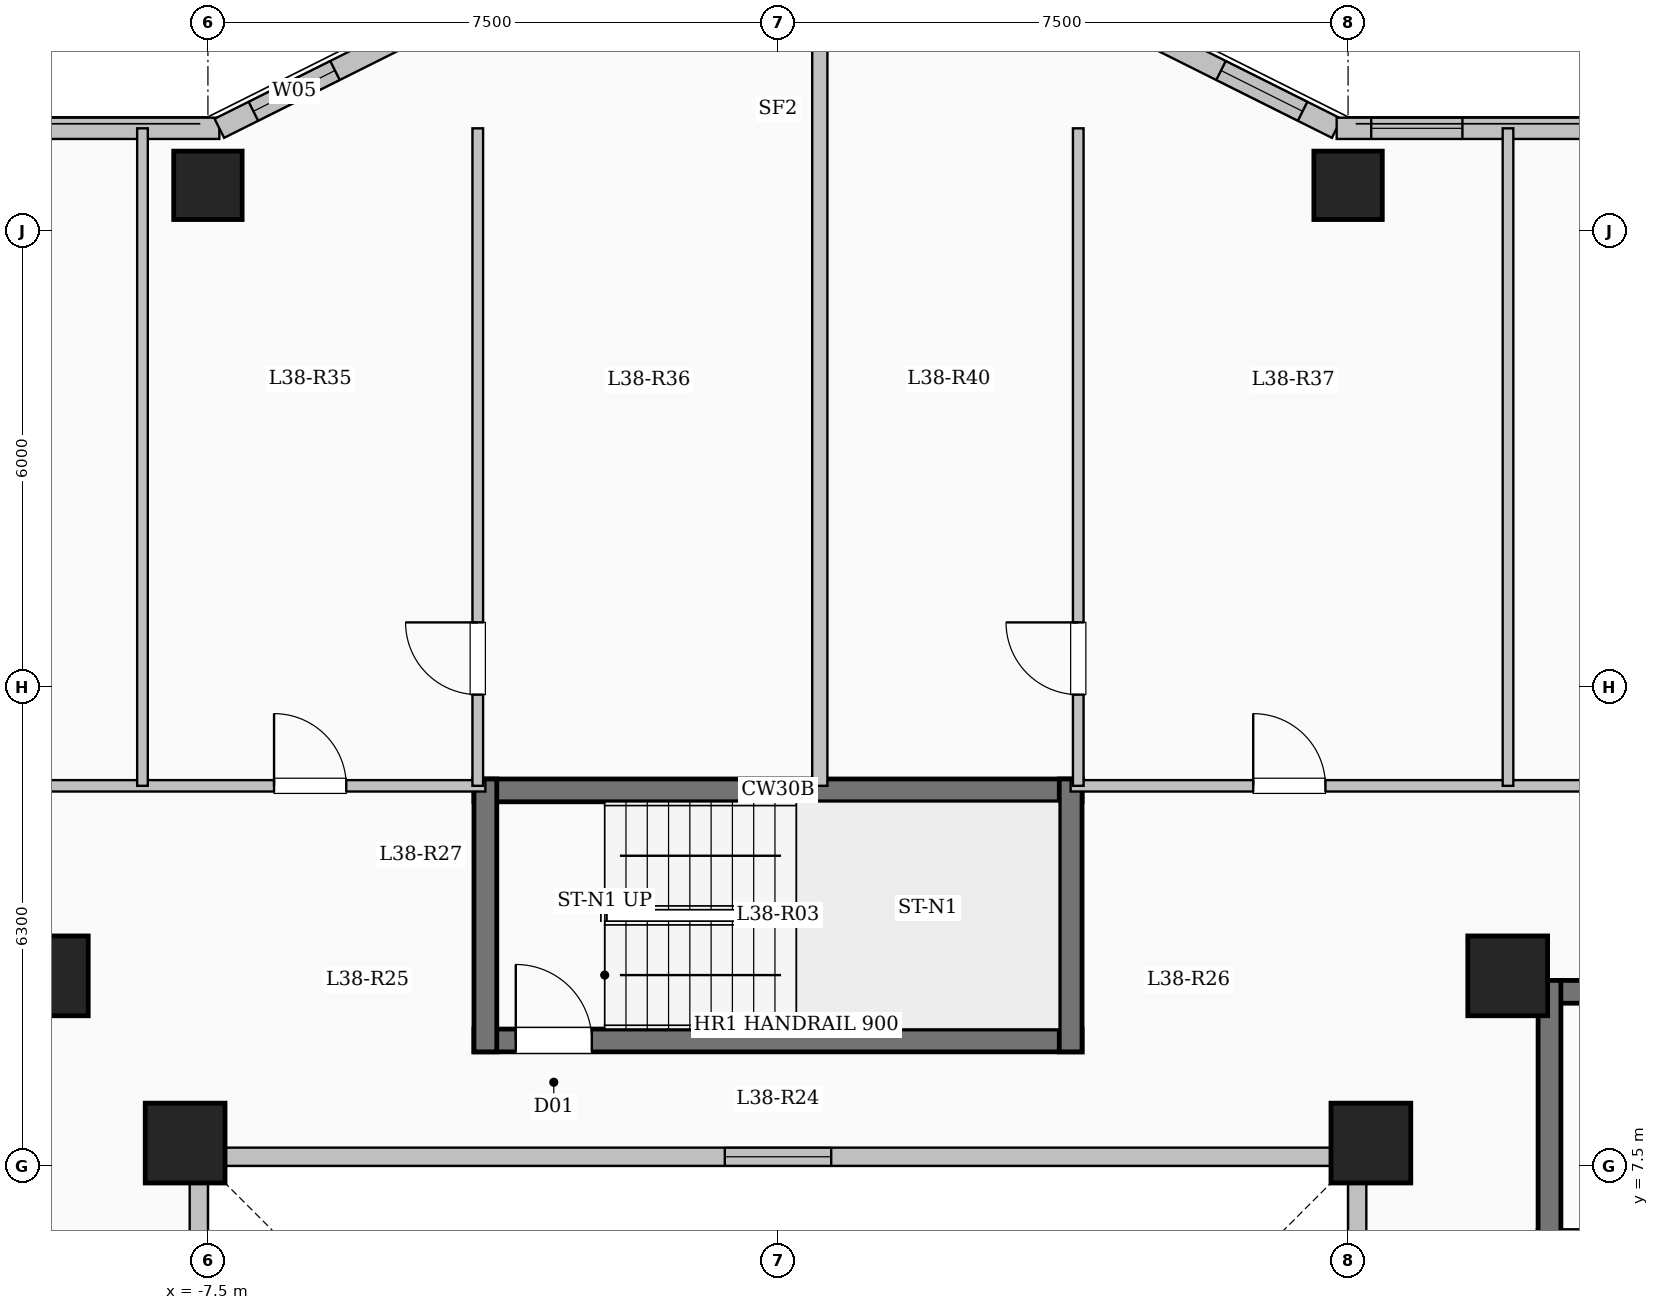
"""IFC4 building model, lengths in metres.
Left out: names, types, materials, properties, quantities, classifications, styles, units other than length and angle.
Written with IfcOpenShell. Run it as: python <this file> out.ifc"""

import sys

from ifc_helpers import new_model, si_unit, direction, frame, frame_2d, origin, origin_2d, place, context, subcontext, project, spatial, rectangle, extrude, element, fill, save


model = new_model("IFC4")
c1 = context("Model", 3, precision=1e-05, world=origin(), true_north=direction((0.0, 1.0)))
c2 = subcontext(c1, "Body", "Model", "MODEL_VIEW")
j1 = project(units=[si_unit("LENGTHUNIT", "METRE"), si_unit("PLANEANGLEUNIT", "RADIAN")], contexts=[c1])
p1 = place(None, origin())
s1 = spatial("IfcSite", under=j1, at=p1, CompositionType="ELEMENT")
p2 = place(p1, origin())
s2 = spatial("IfcBuilding", under=s1, at=p2, CompositionType="ELEMENT")
p3 = place(p2, frame((0.0, 0.0, 142.65)))
s3 = spatial("IfcBuildingStorey", under=s2, at=p3, CompositionType="ELEMENT", Elevation=142.65)
for number, where, z_axis, x_axis in (
    (1, (-7.8, 7.8, 0.0), (0.0, 0.0, 1.0), (1.0, 0.0, 0.0)),
    (2, (7.8, 7.8, 0.0), (0.0, 0.0, 1.0), (1.0, 0.0, 0.0)),
    (3, (-9.6, 10.0, 0.0), (0.0, 0.0, 1.0), (1.0, 0.0, 0.0)),
    (4, (9.6, 10.0, 0.0), (0.0, 0.0, 1.0), (1.0, 0.0, 0.0)),
):
    element("IfcColumn", number, at=place(p3, frame(where, z_axis=z_axis, x_axis=x_axis)), inside=s3, PredefinedType="COLUMN", context=c2, shape_type="SweptSolid", body=[
        extrude(rectangle(XDim=1.05, YDim=1.05, at=origin_2d()), origin(), (0.0, 0.0, 1.0), 3.35),
    ])
for number, where, z_axis, x_axis in (
    (5, (-7.5, 20.4, 0.0), (0.0, 0.0, 1.0), (1.0, 0.0, 0.0)),
    (6, (7.5, 20.4, 0.0), (0.0, 0.0, 1.0), (1.0, 0.0, 0.0)),
):
    element("IfcColumn", number, at=place(p3, frame(where, z_axis=z_axis, x_axis=x_axis)), inside=s3, PredefinedType="COLUMN", context=c2, shape_type="SweptSolid", body=[
        extrude(rectangle(XDim=0.9, YDim=0.9, at=origin_2d()), origin(), (0.0, 0.0, 1.0), 3.35),
    ])
p4 = place(p3, frame((7.62, -7.62, 0.0), z_axis=(0.0, 0.0, 1.0), x_axis=(0.0, 1.0, 0.0)))
e7 = element("IfcWall", 7, at=p4, inside=s3, PredefinedType="SOLIDWALL", context=c2, shape_type="SweptSolid", body=[
    extrude(rectangle(XDim=15.24, YDim=0.24, at=frame_2d((7.62, 0.0))), origin(), (0.0, 0.0, 1.0), 3.1),
])
p5 = place(p4, frame((6.92, 0.0, 0.95)))
e8 = element("IfcOpeningElement", 8, at=p5, cuts=e7, PredefinedType="OPENING", context=c2, shape_type="SweptSolid", body=[
    extrude(rectangle(XDim=1.4, YDim=1.5, at=frame_2d((0.7, 0.75))), frame((0.0, 0.13, 0.0), z_axis=(0.0, -1.0, 0.0), x_axis=(1.0, 0.0, 0.0)), (0.0, 0.0, 1.0), 0.26),
])
p6 = place(p3, frame((7.62, 7.62, 0.0), z_axis=(0.0, 0.0, 1.0), x_axis=(-1.0, 0.0, 0.0)))
e9 = element("IfcWall", 9, at=p6, inside=s3, PredefinedType="SOLIDWALL", context=c2, shape_type="SweptSolid", body=[
    extrude(rectangle(XDim=15.24, YDim=0.24, at=frame_2d((7.62, 0.0))), origin(), (0.0, 0.0, 1.0), 3.1),
])
p7 = place(p6, frame((6.92, 0.0, 0.95)))
e10 = element("IfcOpeningElement", 10, at=p7, cuts=e9, PredefinedType="OPENING", context=c2, shape_type="SweptSolid", body=[
    extrude(rectangle(XDim=1.4, YDim=1.5, at=frame_2d((0.7, 0.75))), frame((0.0, 0.13, 0.0), z_axis=(0.0, -1.0, 0.0), x_axis=(1.0, 0.0, 0.0)), (0.0, 0.0, 1.0), 0.26),
])
p8 = place(p3, frame((-7.62, 7.62, 0.0), z_axis=(0.0, 0.0, 1.0), x_axis=(0.0, -1.0, 0.0)))
e11 = element("IfcWall", 11, at=p8, inside=s3, PredefinedType="SOLIDWALL", context=c2, shape_type="SweptSolid", body=[
    extrude(rectangle(XDim=15.24, YDim=0.24, at=frame_2d((7.62, 0.0))), origin(), (0.0, 0.0, 1.0), 3.1),
])
p9 = place(p8, frame((6.92, 0.0, 0.95)))
e12 = element("IfcOpeningElement", 12, at=p9, cuts=e11, PredefinedType="OPENING", context=c2, shape_type="SweptSolid", body=[
    extrude(rectangle(XDim=1.4, YDim=1.5, at=frame_2d((0.7, 0.75))), frame((0.0, 0.13, 0.0), z_axis=(0.0, -1.0, 0.0), x_axis=(1.0, 0.0, 0.0)), (0.0, 0.0, 1.0), 0.26),
])
p10 = place(p3, frame((-19.65, 21.15, 0.0), z_axis=(0.0, 0.0, 1.0), x_axis=(1.0, 0.0, 0.0)))
e13 = element("IfcWall", 13, at=p10, inside=s3, PredefinedType="SOLIDWALL", context=c2, shape_type="SweptSolid", body=[
    extrude(rectangle(XDim=12.3, YDim=0.28, at=frame_2d((6.15, 0.0))), origin(), (0.0, 0.0, 1.0), 3.1),
])
p11 = place(p10, frame((1.862, 0.0, 0.9)))
e14 = element("IfcOpeningElement", 14, at=p11, cuts=e13, PredefinedType="OPENING", context=c2, shape_type="SweptSolid", body=[
    extrude(rectangle(XDim=2.0, YDim=1.7, at=frame_2d((1.0, 0.85))), frame((0.0, 0.15, 0.0), z_axis=(0.0, -1.0, 0.0), x_axis=(1.0, 0.0, 0.0)), (0.0, 0.0, 1.0), 0.3),
])
p12 = place(p10, frame((7.485, 0.0, 0.9)))
e15 = element("IfcOpeningElement", 15, at=p12, cuts=e13, PredefinedType="OPENING", context=c2, shape_type="SweptSolid", body=[
    extrude(rectangle(XDim=2.0, YDim=1.7, at=frame_2d((1.0, 0.85))), frame((0.0, 0.15, 0.0), z_axis=(0.0, -1.0, 0.0), x_axis=(1.0, 0.0, 0.0)), (0.0, 0.0, 1.0), 0.3),
])
p13 = place(p3, frame((-7.35, 21.15, 0.0), z_axis=(0.0, 0.0, 1.0), x_axis=(0.894427191, 0.4472135955, 0.0)))
e16 = element("IfcWall", 16, at=p13, inside=s3, PredefinedType="SOLIDWALL", context=c2, shape_type="SweptSolid", body=[
    extrude(rectangle(XDim=3.354, YDim=0.28, at=frame_2d((1.677, 0.0))), origin(), (0.0, 0.0, 1.0), 3.1),
])
p14 = place(p13, frame((0.501, 0.0, 0.95)))
e17 = element("IfcOpeningElement", 17, at=p14, cuts=e16, PredefinedType="OPENING", context=c2, shape_type="SweptSolid", body=[
    extrude(rectangle(XDim=1.2, YDim=1.5, at=frame_2d((0.6, 0.75))), frame((0.0, 0.15, 0.0), z_axis=(0.0, -1.0, 0.0), x_axis=(1.0, 0.0, 0.0)), (0.0, 0.0, 1.0), 0.3),
])
p15 = place(p3, frame((4.35, 22.65, 0.0), z_axis=(0.0, 0.0, 1.0), x_axis=(0.894427191, -0.4472135955, 0.0)))
e18 = element("IfcWall", 18, at=p15, inside=s3, PredefinedType="SOLIDWALL", context=c2, shape_type="SweptSolid", body=[
    extrude(rectangle(XDim=3.354, YDim=0.28, at=frame_2d((1.677, 0.0))), origin(), (0.0, 0.0, 1.0), 3.1),
])
p16 = place(p15, frame((1.653, 0.0, 0.95)))
e19 = element("IfcOpeningElement", 19, at=p16, cuts=e18, PredefinedType="OPENING", context=c2, shape_type="SweptSolid", body=[
    extrude(rectangle(XDim=1.2, YDim=1.5, at=frame_2d((0.6, 0.75))), frame((0.0, 0.15, 0.0), z_axis=(0.0, -1.0, 0.0), x_axis=(1.0, 0.0, 0.0)), (0.0, 0.0, 1.0), 0.3),
])
p17 = place(p3, frame((7.35, 21.15, 0.0), z_axis=(0.0, 0.0, 1.0), x_axis=(1.0, 0.0, 0.0)))
e20 = element("IfcWall", 20, at=p17, inside=s3, PredefinedType="SOLIDWALL", context=c2, shape_type="SweptSolid", body=[
    extrude(rectangle(XDim=12.3, YDim=0.28, at=frame_2d((6.15, 0.0))), origin(), (0.0, 0.0, 1.0), 3.1),
])
p18 = place(p17, frame((0.454, 0.0, 0.95)))
e21 = element("IfcOpeningElement", 21, at=p18, cuts=e20, PredefinedType="OPENING", context=c2, shape_type="SweptSolid", body=[
    extrude(rectangle(XDim=1.2, YDim=1.5, at=frame_2d((0.6, 0.75))), frame((0.0, 0.15, 0.0), z_axis=(0.0, -1.0, 0.0), x_axis=(1.0, 0.0, 0.0)), (0.0, 0.0, 1.0), 0.3),
])
p19 = place(p17, frame((4.045, 0.0, 0.9)))
e22 = element("IfcOpeningElement", 22, at=p19, cuts=e20, PredefinedType="OPENING", context=c2, shape_type="SweptSolid", body=[
    extrude(rectangle(XDim=2.0, YDim=1.7, at=frame_2d((1.0, 0.85))), frame((0.0, 0.15, 0.0), z_axis=(0.0, -1.0, 0.0), x_axis=(1.0, 0.0, 0.0)), (0.0, 0.0, 1.0), 0.3),
])
p20 = place(p17, frame((9.066, 0.0, 0.9)))
e23 = element("IfcOpeningElement", 23, at=p20, cuts=e20, PredefinedType="OPENING", context=c2, shape_type="SweptSolid", body=[
    extrude(rectangle(XDim=2.0, YDim=1.7, at=frame_2d((1.0, 0.85))), frame((0.0, 0.15, 0.0), z_axis=(0.0, -1.0, 0.0), x_axis=(1.0, 0.0, 0.0)), (0.0, 0.0, 1.0), 0.3),
])
p21 = place(p3, frame((10.0, 9.79, 0.0), z_axis=(0.0, 0.0, 1.0), x_axis=(1.0, 0.0, 0.0)))
e24 = element("IfcWall", 24, at=p21, inside=s3, PredefinedType="SHEAR", context=c2, shape_type="SweptSolid", body=[
    extrude(rectangle(XDim=8.0, YDim=0.3, at=frame_2d((4.0, 0.0))), origin(), (0.0, 0.0, 1.0), 3.35),
])
p22 = place(p3, frame((10.0, 6.5, 0.0), z_axis=(0.0, 0.0, 1.0), x_axis=(1.0, 0.0, 0.0)))
e25 = element("IfcWall", 25, at=p22, inside=s3, PredefinedType="SHEAR", context=c2, shape_type="SweptSolid", body=[
    extrude(rectangle(XDim=8.0, YDim=0.3, at=frame_2d((4.0, 0.0))), origin(), (0.0, 0.0, 1.0), 3.35),
])
p23 = place(p22, frame((0.55, 0.0, 0.0)))
e26 = element("IfcOpeningElement", 26, at=p23, cuts=e25, PredefinedType="OPENING", context=c2, shape_type="SweptSolid", body=[
    extrude(rectangle(XDim=1.0, YDim=2.15, at=frame_2d((0.5, 1.075))), frame((0.0, 0.16, 0.0), z_axis=(0.0, -1.0, 0.0), x_axis=(1.0, 0.0, 0.0)), (0.0, 0.0, 1.0), 0.32),
])
p24 = place(p3, frame((10.15, 6.35, 0.0), z_axis=(0.0, 0.0, 1.0), x_axis=(0.0, 1.0, 0.0)))
e27 = element("IfcWall", 27, at=p24, inside=s3, PredefinedType="SHEAR", context=c2, shape_type="SweptSolid", body=[
    extrude(rectangle(XDim=3.59, YDim=0.3, at=frame_2d((1.795, 0.0))), origin(), (0.0, 0.0, 1.0), 3.35),
])
p25 = place(p3, frame((-4.0, 12.44, 0.0), z_axis=(0.0, 0.0, 1.0), x_axis=(1.0, 0.0, 0.0)))
e28 = element("IfcWall", 28, at=p25, inside=s3, PredefinedType="SHEAR", context=c2, shape_type="SweptSolid", body=[
    extrude(rectangle(XDim=8.0, YDim=0.3, at=frame_2d((4.0, 0.0))), origin(), (0.0, 0.0, 1.0), 3.35),
])
p26 = place(p3, frame((-4.0, 9.15, 0.0), z_axis=(0.0, 0.0, 1.0), x_axis=(1.0, 0.0, 0.0)))
e29 = element("IfcWall", 29, at=p26, inside=s3, PredefinedType="SHEAR", context=c2, shape_type="SweptSolid", body=[
    extrude(rectangle(XDim=8.0, YDim=0.3, at=frame_2d((4.0, 0.0))), origin(), (0.0, 0.0, 1.0), 3.35),
])
p27 = place(p26, frame((0.55, 0.0, 0.0)))
e30 = element("IfcOpeningElement", 30, at=p27, cuts=e29, PredefinedType="OPENING", context=c2, shape_type="SweptSolid", body=[
    extrude(rectangle(XDim=1.0, YDim=2.15, at=frame_2d((0.5, 1.075))), frame((0.0, 0.16, 0.0), z_axis=(0.0, -1.0, 0.0), x_axis=(1.0, 0.0, 0.0)), (0.0, 0.0, 1.0), 0.32),
])
for number, where, z_axis, x_axis in (
    (31, (-3.85, 9.0, 0.0), (0.0, 0.0, 1.0), (0.0, 1.0, 0.0)),
    (32, (3.85, 9.0, 0.0), (0.0, 0.0, 1.0), (0.0, 1.0, 0.0)),
):
    element("IfcWall", number, at=place(p3, frame(where, z_axis=z_axis, x_axis=x_axis)), inside=s3, PredefinedType="SHEAR", context=c2, shape_type="SweptSolid", body=[
        extrude(rectangle(XDim=3.59, YDim=0.3, at=frame_2d((1.795, 0.0))), origin(), (0.0, 0.0, 1.0), 3.35),
    ])
p28 = place(p3, frame((-19.55, 12.5, 0.0), z_axis=(0.0, 0.0, 1.0), x_axis=(1.0, 0.0, 0.0)))
e33 = element("IfcWall", 33, at=p28, inside=s3, PredefinedType="PARTITIONING", context=c2, shape_type="SweptSolid", body=[
    extrude(rectangle(XDim=15.7, YDim=0.15, at=frame_2d((7.85, 0.0))), origin(), (0.0, 0.0, 1.0), 3.1),
])
p29 = place(p28, frame((2.292, 0.0, 0.0)))
e34 = element("IfcOpeningElement", 34, at=p29, cuts=e33, PredefinedType="OPENING", context=c2, shape_type="SweptSolid", body=[
    extrude(rectangle(XDim=0.95, YDim=2.15, at=frame_2d((0.475, 1.075))), frame((0.0, 0.085, 0.0), z_axis=(0.0, -1.0, 0.0), x_axis=(1.0, 0.0, 0.0)), (0.0, 0.0, 1.0), 0.17),
])
p30 = place(p28, frame((7.917, 0.0, 0.0)))
e35 = element("IfcOpeningElement", 35, at=p30, cuts=e33, PredefinedType="OPENING", context=c2, shape_type="SweptSolid", body=[
    extrude(rectangle(XDim=0.95, YDim=2.15, at=frame_2d((0.475, 1.075))), frame((0.0, 0.085, 0.0), z_axis=(0.0, -1.0, 0.0), x_axis=(1.0, 0.0, 0.0)), (0.0, 0.0, 1.0), 0.17),
])
p31 = place(p28, frame((12.92, 0.0, 0.0)))
e36 = element("IfcOpeningElement", 36, at=p31, cuts=e33, PredefinedType="OPENING", context=c2, shape_type="SweptSolid", body=[
    extrude(rectangle(XDim=0.95, YDim=2.15, at=frame_2d((0.475, 1.075))), frame((0.0, 0.085, 0.0), z_axis=(0.0, -1.0, 0.0), x_axis=(1.0, 0.0, 0.0)), (0.0, 0.0, 1.0), 0.17),
])
p32 = place(p3, frame((3.85, 12.5, 0.0), z_axis=(0.0, 0.0, 1.0), x_axis=(1.0, 0.0, 0.0)))
e37 = element("IfcWall", 37, at=p32, inside=s3, PredefinedType="PARTITIONING", context=c2, shape_type="SweptSolid", body=[
    extrude(rectangle(XDim=15.7, YDim=0.15, at=frame_2d((7.85, 0.0))), origin(), (0.0, 0.0, 1.0), 3.1),
])
p33 = place(p32, frame((2.402, 0.0, 0.0)))
e38 = element("IfcOpeningElement", 38, at=p33, cuts=e37, PredefinedType="OPENING", context=c2, shape_type="SweptSolid", body=[
    extrude(rectangle(XDim=0.95, YDim=2.15, at=frame_2d((0.475, 1.075))), frame((0.0, 0.085, 0.0), z_axis=(0.0, -1.0, 0.0), x_axis=(1.0, 0.0, 0.0)), (0.0, 0.0, 1.0), 0.17),
])
p34 = place(p32, frame((8.026, 0.0, 0.0)))
e39 = element("IfcOpeningElement", 39, at=p34, cuts=e37, PredefinedType="OPENING", context=c2, shape_type="SweptSolid", body=[
    extrude(rectangle(XDim=0.95, YDim=2.15, at=frame_2d((0.475, 1.075))), frame((0.0, 0.085, 0.0), z_axis=(0.0, -1.0, 0.0), x_axis=(1.0, 0.0, 0.0)), (0.0, 0.0, 1.0), 0.17),
])
p35 = place(p32, frame((13.03, 0.0, 0.0)))
e40 = element("IfcOpeningElement", 40, at=p35, cuts=e37, PredefinedType="OPENING", context=c2, shape_type="SweptSolid", body=[
    extrude(rectangle(XDim=0.95, YDim=2.15, at=frame_2d((0.475, 1.075))), frame((0.0, 0.085, 0.0), z_axis=(0.0, -1.0, 0.0), x_axis=(1.0, 0.0, 0.0)), (0.0, 0.0, 1.0), 0.17),
])
p36 = place(p3, frame((0.55, 12.5, 0.0), z_axis=(0.0, 0.0, 1.0), x_axis=(0.0, 1.0, 0.0)))
e41 = element("IfcWall", 41, at=p36, inside=s3, PredefinedType="SOLIDWALL", context=c2, shape_type="SweptSolid", body=[
    extrude(rectangle(XDim=10.18, YDim=0.2, at=frame_2d((5.09, 0.0))), origin(), (0.0, 0.0, 1.0), 3.1),
])
p37 = place(p3, frame((-3.95, 12.5, 0.0), z_axis=(0.0, 0.0, 1.0), x_axis=(0.0, 1.0, 0.0)))
e42 = element("IfcWall", 42, at=p37, inside=s3, PredefinedType="PARTITIONING", context=c2, shape_type="SweptSolid", body=[
    extrude(rectangle(XDim=8.65, YDim=0.14, at=frame_2d((4.325, 0.0))), origin(), (0.0, 0.0, 1.0), 3.1),
])
p38 = place(p37, frame((1.2, 0.0, 0.0)))
e43 = element("IfcOpeningElement", 43, at=p38, cuts=e42, PredefinedType="OPENING", context=c2, shape_type="SweptSolid", body=[
    extrude(rectangle(XDim=0.95, YDim=2.15, at=frame_2d((0.475, 1.075))), frame((0.0, 0.08, 0.0), z_axis=(0.0, -1.0, 0.0), x_axis=(1.0, 0.0, 0.0)), (0.0, 0.0, 1.0), 0.16),
])
p39 = place(p3, frame((-8.361, 12.5, 0.0), z_axis=(0.0, 0.0, 1.0), x_axis=(0.0, 1.0, 0.0)))
e44 = element("IfcWall", 44, at=p39, inside=s3, PredefinedType="PARTITIONING", context=c2, shape_type="SweptSolid", body=[
    extrude(rectangle(XDim=8.65, YDim=0.14, at=frame_2d((4.325, 0.0))), origin(), (0.0, 0.0, 1.0), 3.1),
])
p40 = place(p3, frame((3.95, 12.5, 0.0), z_axis=(0.0, 0.0, 1.0), x_axis=(0.0, 1.0, 0.0)))
e45 = element("IfcWall", 45, at=p40, inside=s3, PredefinedType="PARTITIONING", context=c2, shape_type="SweptSolid", body=[
    extrude(rectangle(XDim=8.65, YDim=0.14, at=frame_2d((4.325, 0.0))), origin(), (0.0, 0.0, 1.0), 3.1),
])
p41 = place(p40, frame((1.2, 0.0, 0.0)))
e46 = element("IfcOpeningElement", 46, at=p41, cuts=e45, PredefinedType="OPENING", context=c2, shape_type="SweptSolid", body=[
    extrude(rectangle(XDim=0.95, YDim=2.15, at=frame_2d((0.475, 1.075))), frame((0.0, 0.08, 0.0), z_axis=(0.0, -1.0, 0.0), x_axis=(1.0, 0.0, 0.0)), (0.0, 0.0, 1.0), 0.16),
])
p42 = place(p3, frame((9.604, 12.5, 0.0), z_axis=(0.0, 0.0, 1.0), x_axis=(0.0, 1.0, 0.0)))
e47 = element("IfcWall", 47, at=p42, inside=s3, PredefinedType="PARTITIONING", context=c2, shape_type="SweptSolid", body=[
    extrude(rectangle(XDim=8.65, YDim=0.14, at=frame_2d((4.325, 0.0))), origin(), (0.0, 0.0, 1.0), 3.1),
])
p43 = place(p7, origin())
e48 = element("IfcWindow", 48, at=p43, inside=s3, PartitioningType="SINGLE_PANEL", PredefinedType="WINDOW", context=c2, shape_type="SweptSolid", body=[
    extrude(rectangle(XDim=1.4, YDim=1.5, at=frame_2d((0.7, 0.75))), frame((0.0, 0.03, 0.0), z_axis=(0.0, -1.0, 0.0), x_axis=(1.0, 0.0, 0.0)), (0.0, 0.0, 1.0), 0.06),
])
fill(e10, e48)
p44 = place(p14, origin())
e49 = element("IfcWindow", 49, at=p44, inside=s3, PartitioningType="SINGLE_PANEL", PredefinedType="WINDOW", context=c2, shape_type="SweptSolid", body=[
    extrude(rectangle(XDim=1.2, YDim=1.5, at=frame_2d((0.6, 0.75))), frame((0.0, 0.03, 0.0), z_axis=(0.0, -1.0, 0.0), x_axis=(1.0, 0.0, 0.0)), (0.0, 0.0, 1.0), 0.06),
])
fill(e17, e49)
p45 = place(p16, origin())
e50 = element("IfcWindow", 50, at=p45, inside=s3, PartitioningType="SINGLE_PANEL", PredefinedType="WINDOW", context=c2, shape_type="SweptSolid", body=[
    extrude(rectangle(XDim=1.2, YDim=1.5, at=frame_2d((0.6, 0.75))), frame((0.0, 0.03, 0.0), z_axis=(0.0, -1.0, 0.0), x_axis=(1.0, 0.0, 0.0)), (0.0, 0.0, 1.0), 0.06),
])
fill(e19, e50)
p46 = place(p18, origin())
e51 = element("IfcWindow", 51, at=p46, inside=s3, PartitioningType="SINGLE_PANEL", PredefinedType="WINDOW", context=c2, shape_type="SweptSolid", body=[
    extrude(rectangle(XDim=1.2, YDim=1.5, at=frame_2d((0.6, 0.75))), frame((0.0, 0.03, 0.0), z_axis=(0.0, -1.0, 0.0), x_axis=(1.0, 0.0, 0.0)), (0.0, 0.0, 1.0), 0.06),
])
fill(e21, e51)
p47 = place(p27, origin())
e52 = element("IfcDoor", 52, at=p47, inside=s3, OperationType="SINGLE_SWING_LEFT", PredefinedType="DOOR", context=c2, shape_type="SweptSolid", body=[
    extrude(rectangle(XDim=1.0, YDim=2.15, at=frame_2d((0.5, 1.075))), frame((0.0, 0.025, 0.0), z_axis=(0.0, -1.0, 0.0), x_axis=(1.0, 0.0, 0.0)), (0.0, 0.0, 1.0), 0.05),
])
fill(e30, e52)
p48 = place(p31, origin())
e53 = element("IfcDoor", 53, at=p48, inside=s3, OperationType="SINGLE_SWING_LEFT", PredefinedType="DOOR", context=c2, shape_type="SweptSolid", body=[
    extrude(rectangle(XDim=0.95, YDim=2.15, at=frame_2d((0.475, 1.075))), frame((0.0, 0.025, 0.0), z_axis=(0.0, -1.0, 0.0), x_axis=(1.0, 0.0, 0.0)), (0.0, 0.0, 1.0), 0.05),
])
fill(e36, e53)
p49 = place(p38, origin())
e54 = element("IfcDoor", 54, at=p49, inside=s3, OperationType="SINGLE_SWING_RIGHT", PredefinedType="DOOR", context=c2, shape_type="SweptSolid", body=[
    extrude(rectangle(XDim=0.95, YDim=2.15, at=frame_2d((0.475, 1.075))), frame((0.0, 0.025, 0.0), z_axis=(0.0, -1.0, 0.0), x_axis=(1.0, 0.0, 0.0)), (0.0, 0.0, 1.0), 0.05),
])
fill(e43, e54)
p50 = place(p33, origin())
e55 = element("IfcDoor", 55, at=p50, inside=s3, OperationType="SINGLE_SWING_LEFT", PredefinedType="DOOR", context=c2, shape_type="SweptSolid", body=[
    extrude(rectangle(XDim=0.95, YDim=2.15, at=frame_2d((0.475, 1.075))), frame((0.0, 0.025, 0.0), z_axis=(0.0, -1.0, 0.0), x_axis=(1.0, 0.0, 0.0)), (0.0, 0.0, 1.0), 0.05),
])
fill(e38, e55)
p51 = place(p41, origin())
e56 = element("IfcDoor", 56, at=p51, inside=s3, OperationType="SINGLE_SWING_RIGHT", PredefinedType="DOOR", context=c2, shape_type="SweptSolid", body=[
    extrude(rectangle(XDim=0.95, YDim=2.15, at=frame_2d((0.475, 1.075))), frame((0.0, 0.025, 0.0), z_axis=(0.0, -1.0, 0.0), x_axis=(1.0, 0.0, 0.0)), (0.0, 0.0, 1.0), 0.05),
])
fill(e46, e56)
save(model, sys.argv[1])
